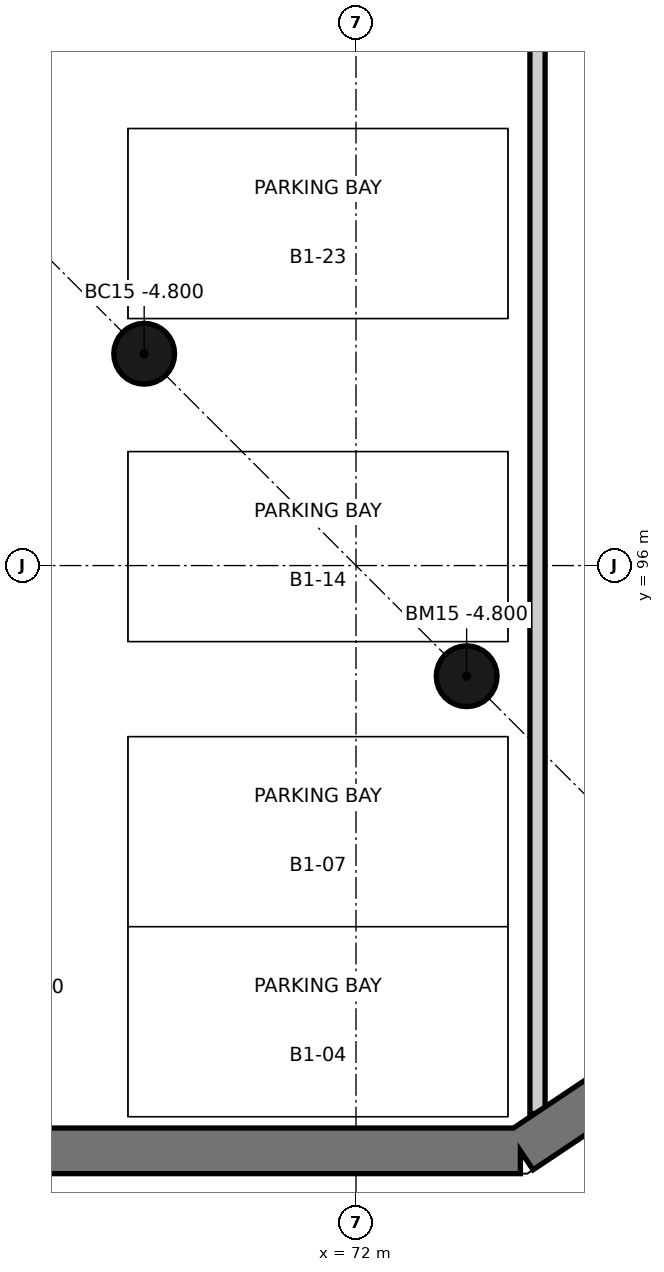
"""IFC4 building model, lengths in metres.
Left out: names, types, materials, properties, quantities, classifications, styles, units other than length and angle.
Written with IfcOpenShell. Run it as: python <this file> out.ifc"""

import sys

from ifc_helpers import new_model, si_unit, direction, frame, frame_2d, origin, origin_2d, place, context, subcontext, project, spatial, polyline, rectangle, circle, outline, extrude, element, save


model = new_model("IFC4")
c1 = context("Model", 3, precision=1e-05, world=origin(), true_north=direction((0.0, 1.0)))
c2 = subcontext(c1, "Body", "Model", "MODEL_VIEW")
j1 = project(units=[si_unit("LENGTHUNIT", "METRE"), si_unit("PLANEANGLEUNIT", "RADIAN")], contexts=[c1])
p1 = place(None, origin())
s1 = spatial("IfcSite", under=j1, at=p1, CompositionType="ELEMENT")
p2 = place(p1, origin())
s2 = spatial("IfcBuilding", under=s1, at=p2, CompositionType="ELEMENT")
p3 = place(p2, frame((0.0, 0.0, -4.2)))
s3 = spatial("IfcBuildingStorey", under=s2, at=p3, CompositionType="ELEMENT", Elevation=-4.2)
for number, where, z_axis, x_axis in (
    (1, (69.213, 98.787, -0.6), (0.0, 0.0, 1.0), (1.0, 0.0, 0.0)),
    (2, (73.456, 94.544, -0.6), (0.0, 0.0, 1.0), (1.0, 0.0, 0.0)),
):
    element("IfcColumn", number, at=place(p3, frame(where, z_axis=z_axis, x_axis=x_axis)), inside=s3, PredefinedType="COLUMN", context=c2, shape_type="SweptSolid", body=[
        extrude(circle(Radius=0.4, at=origin_2d()), origin(), (0.0, 0.0, 1.0), 4.35),
    ])
p4 = place(p3, frame((32.9, 88.3, -0.6), z_axis=(0.0, 0.0, 1.0), x_axis=(1.0, 0.0, 0.0)))
e3 = element("IfcWall", 3, at=p4, inside=s3, PredefinedType="SOLIDWALL", context=c2, shape_type="SweptSolid", body=[
    extrude(outline(polyline([(0.0, -0.3), (41.354, -0.3), (41.172, 0.3), (0.0, 0.3), (0.0, -0.3)])), origin(), (0.0, 0.0, 1.0), 4.8),
])
p5 = place(p3, frame((74.163, 88.3, -0.6), z_axis=(0.0, 0.0, 1.0), x_axis=(0.83146646451, 0.555574943995, 0.0)))
e4 = element("IfcWall", 4, at=p5, inside=s3, PredefinedType="SOLIDWALL", context=c2, shape_type="SweptSolid", body=[
    extrude(outline(polyline([(-0.091, -0.3), (4.052, -0.3), (3.932, 0.3), (0.091, 0.3), (-0.091, -0.3)])), origin(), (0.0, 0.0, 1.0), 4.8),
])
p6 = place(p3, frame((74.388, 88.791, 0.0), z_axis=(0.0, 0.0, 1.0), x_axis=(0.0, 1.0, 0.0)))
e5 = element("IfcWall", 5, at=p6, inside=s3, PredefinedType="SOLIDWALL", context=c2, shape_type="SweptSolid", body=[
    extrude(rectangle(XDim=30.329, YDim=0.2, at=frame_2d((15.165, 0.0))), origin(), (0.0, 0.0, 1.0), 3.75),
])
p7 = place(p6, frame((14.264, 0.0, 0.0)))
e6 = element("IfcOpeningElement", 6, at=p7, cuts=e5, PredefinedType="OPENING", context=c2, shape_type="SweptSolid", body=[
    extrude(rectangle(XDim=1.8, YDim=2.1, at=frame_2d((0.9, 1.05))), frame((0.0, 0.11, 0.0), z_axis=(0.0, -1.0, 0.0), x_axis=(1.0, 0.0, 0.0)), (0.0, 0.0, 1.0), 0.22),
])
save(model, sys.argv[1])
